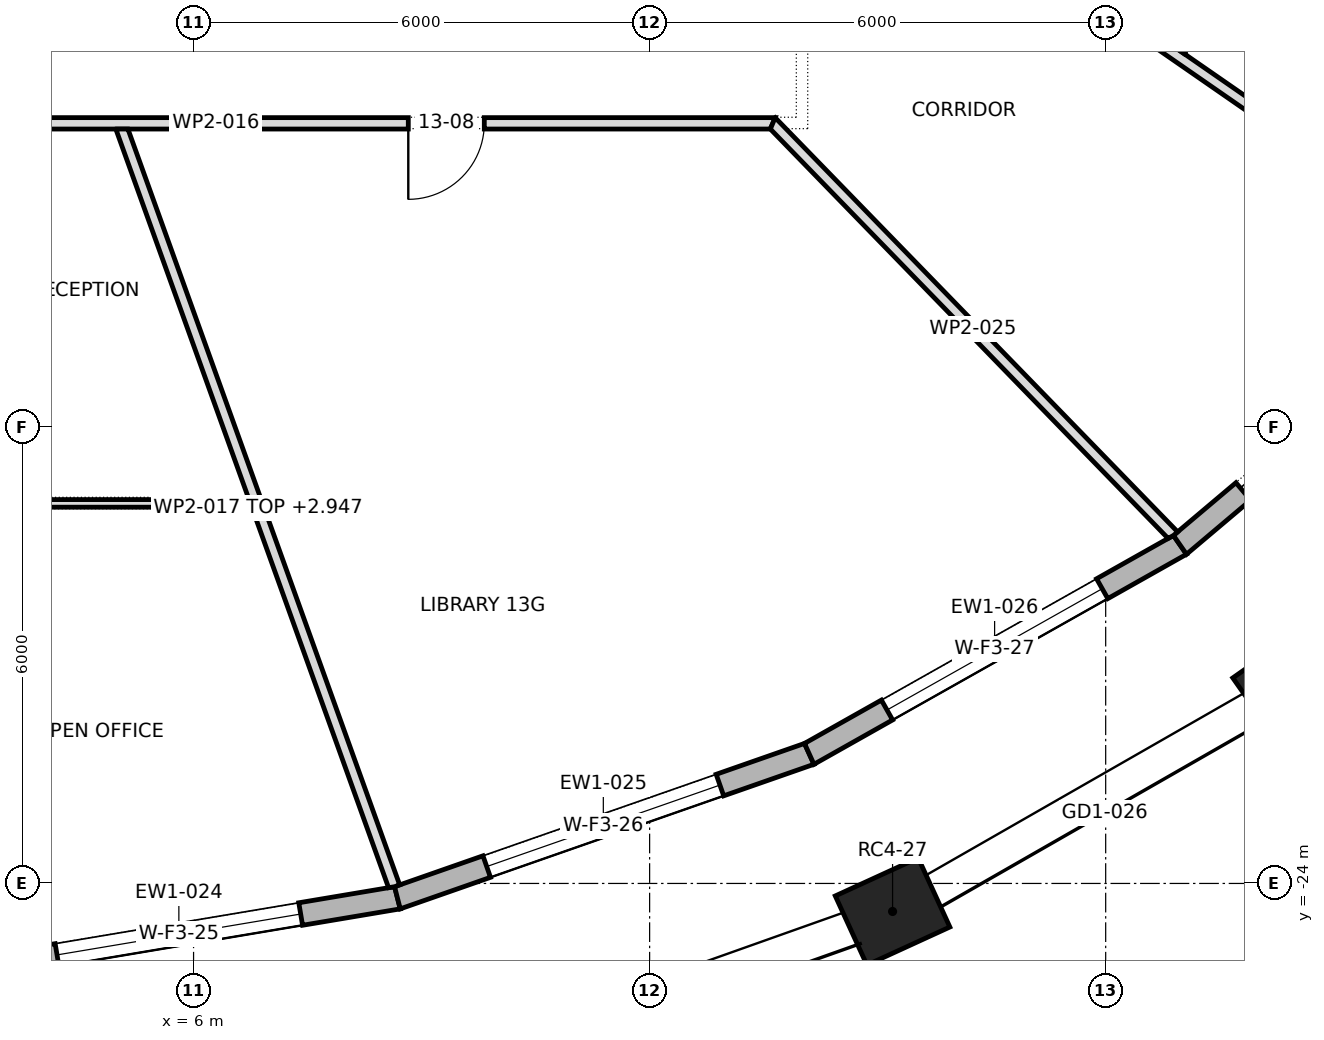
"""IFC4 building model, lengths in metres.
Left out: names, types, materials, properties, quantities, classifications, styles, units other than length and angle.
Written with IfcOpenShell. Run it as: python <this file> out.ifc"""

import sys

from ifc_helpers import new_model, si_unit, direction, frame, frame_2d, origin, origin_2d, place, context, subcontext, project, spatial, polyline, rectangle, outline, extrude, element, fill, save


model = new_model("IFC4")
c1 = context("Model", 3, precision=1e-05, world=origin(), true_north=direction((0.0, 1.0)))
c2 = subcontext(c1, "Body", "Model", "MODEL_VIEW")
j1 = project(units=[si_unit("LENGTHUNIT", "METRE"), si_unit("PLANEANGLEUNIT", "RADIAN")], contexts=[c1])
p1 = place(None, origin())
s1 = spatial("IfcSite", under=j1, at=p1, CompositionType="ELEMENT")
p2 = place(p1, origin())
s2 = spatial("IfcBuilding", under=s1, at=p2, CompositionType="ELEMENT")
p3 = place(p2, frame((0.0, 0.0, 198.9)))
s3 = spatial("IfcBuildingStorey", under=s2, at=p3, CompositionType="ELEMENT", Elevation=198.9)
for number, where, z_axis, x_axis in (
    (1, (15.196, -24.369, 0.0), (0.0, 0.0, 1.0), (0.909, 0.417, 0.0)),
    (2, (20.451, -21.359, 0.0), (0.0, 0.0, 1.0), (0.818, 0.575, 0.0)),
):
    element("IfcColumn", number, at=place(p3, frame(where, z_axis=z_axis, x_axis=x_axis)), inside=s3, PredefinedType="COLUMN", context=c2, shape_type="SweptSolid", body=[
        extrude(rectangle(XDim=1.2, YDim=1.0, at=origin_2d()), origin(), (0.0, 0.0, 1.0), 4.0),
    ])
p4 = place(p3, frame((2.931, -25.154, 0.0), z_axis=(0.0, 0.0, 1.0), x_axis=(0.986207709048, 0.165512400181, 0.0)))
e3 = element("IfcWall", 3, at=p4, inside=s3, PredefinedType="STANDARD", context=c2, shape_type="SweptSolid", body=[
    extrude(outline(polyline([(-0.012, -0.15), (5.844, -0.15), (5.818, 0.15), (0.012, 0.15), (-0.012, -0.15)])), origin(), (0.0, 0.0, 1.0), 3.7),
])
p5 = place(p4, frame((1.291, 0.0, 0.6)))
e4 = element("IfcOpeningElement", 4, at=p5, cuts=e3, PredefinedType="OPENING", context=c2, shape_type="SweptSolid", body=[
    extrude(rectangle(XDim=3.25, YDim=2.65, at=frame_2d((1.625, 1.325))), frame((0.0, 0.162, 0.0), z_axis=(0.0, -1.0, 0.0), x_axis=(1.0, 0.0, 0.0)), (0.0, 0.0, 1.0), 0.324),
])
p6 = place(p3, frame((8.682, -24.189, 0.0), z_axis=(0.0, 0.0, 1.0), x_axis=(0.944020060936, 0.329888048511, 0.0)))
e5 = element("IfcWall", 5, at=p6, inside=s3, PredefinedType="STANDARD", context=c2, shape_type="SweptSolid", body=[
    extrude(outline(polyline([(-0.013, -0.15), (5.753, -0.15), (5.726, 0.15), (0.013, 0.15), (-0.013, -0.15)])), origin(), (0.0, 0.0, 1.0), 3.7),
])
p7 = place(p6, frame((1.245, 0.0, 0.6)))
e6 = element("IfcOpeningElement", 6, at=p7, cuts=e5, PredefinedType="OPENING", context=c2, shape_type="SweptSolid", body=[
    extrude(rectangle(XDim=3.25, YDim=2.65, at=frame_2d((1.625, 1.325))), frame((0.0, 0.162, 0.0), z_axis=(0.0, -1.0, 0.0), x_axis=(1.0, 0.0, 0.0)), (0.0, 0.0, 1.0), 0.324),
])
p8 = place(p3, frame((14.1, -22.295, 0.0), z_axis=(0.0, 0.0, 1.0), x_axis=(0.871083701819, 0.491134588912, 0.0)))
e7 = element("IfcWall", 7, at=p8, inside=s3, PredefinedType="STANDARD", context=c2, shape_type="SweptSolid", body=[
    extrude(outline(polyline([(-0.013, -0.15), (5.614, -0.15), (5.585, 0.15), (0.013, 0.15), (-0.013, -0.15)])), origin(), (0.0, 0.0, 1.0), 3.7),
])
p9 = place(p8, frame((1.175, 0.0, 0.6)))
e8 = element("IfcOpeningElement", 8, at=p9, cuts=e7, PredefinedType="OPENING", context=c2, shape_type="SweptSolid", body=[
    extrude(rectangle(XDim=3.25, YDim=2.65, at=frame_2d((1.625, 1.325))), frame((0.0, 0.162, 0.0), z_axis=(0.0, -1.0, 0.0), x_axis=(1.0, 0.0, 0.0)), (0.0, 0.0, 1.0), 0.324),
])
p10 = place(p3, frame((18.977, -19.545, 0.0), z_axis=(0.0, 0.0, 1.0), x_axis=(0.764330261608, 0.644824977176, 0.0)))
e9 = element("IfcWall", 9, at=p10, inside=s3, PredefinedType="STANDARD", context=c2, shape_type="SweptSolid", body=[
    extrude(outline(polyline([(-0.014, -0.15), (5.445, -0.15), (5.415, 0.15), (0.014, 0.15), (-0.014, -0.15)])), origin(), (0.0, 0.0, 1.0), 3.7),
])
p11 = place(p10, frame((1.09, 0.0, 0.0)))
e10 = element("IfcOpeningElement", 10, at=p11, cuts=e9, PredefinedType="OPENING", context=c2, shape_type="SweptSolid", body=[
    extrude(rectangle(XDim=3.25, YDim=3.25, at=frame_2d((1.625, 1.625))), frame((0.0, 0.162, 0.0), z_axis=(0.0, -1.0, 0.0), x_axis=(1.0, 0.0, 0.0)), (0.0, 0.0, 1.0), 0.324),
])
p12 = place(p3, frame((-1.63, -14.0, 0.0), z_axis=(0.0, 0.0, 1.0), x_axis=(1.0, 0.0, 0.0)))
e11 = element("IfcWall", 11, at=p12, inside=s3, PredefinedType="PARTITIONING", context=c2, shape_type="SweptSolid", body=[
    extrude(outline(polyline([(0.0, -0.075), (1.902, -0.075), (3.804, -0.075), (5.707, -0.075), (7.609, -0.075), (9.511, -0.075), (11.414, -0.075), (13.316, -0.075), (15.218, -0.075), (15.281, 0.075), (15.281, 0.075), (13.371, 0.075), (11.461, 0.075), (9.551, 0.075), (7.641, 0.075), (5.73, 0.075), (3.82, 0.075), (1.91, 0.075), (0.0, 0.075), (0.0, -0.075)])), origin(), (0.0, 0.0, 1.0), 3.7),
])
p13 = place(p12, frame((2.83, 0.0, 0.0)))
e12 = element("IfcOpeningElement", 12, at=p13, cuts=e11, PredefinedType="OPENING", context=c2, shape_type="SweptSolid", body=[
    extrude(rectangle(XDim=1.0, YDim=2.1, at=frame_2d((0.5, 1.05))), frame((0.0, 0.087, 0.0), z_axis=(0.0, -1.0, 0.0), x_axis=(1.0, 0.0, 0.0)), (0.0, 0.0, 1.0), 0.174),
])
p14 = place(p12, frame((10.455, 0.0, 0.0)))
e13 = element("IfcOpeningElement", 13, at=p14, cuts=e11, PredefinedType="OPENING", context=c2, shape_type="SweptSolid", body=[
    extrude(rectangle(XDim=1.0, YDim=2.1, at=frame_2d((0.5, 1.05))), frame((0.0, 0.087, 0.0), z_axis=(0.0, -1.0, 0.0), x_axis=(1.0, 0.0, 0.0)), (0.0, 0.0, 1.0), 0.174),
])
p15 = place(p3, frame((5.048, -14.05, 0.0), z_axis=(0.0, 0.0, 1.0), x_axis=(0.338318960249, -0.941031498482, 0.0)))
e14 = element("IfcWall", 14, at=p15, inside=s3, PredefinedType="PARTITIONING", context=c2, shape_type="SweptSolid", body=[
    extrude(outline(polyline([(0.0, -0.075), (1.727, -0.075), (3.454, -0.075), (5.18, -0.075), (5.181, -0.073), (5.188, -0.075), (6.994, -0.075), (8.8, -0.075), (10.606, -0.075), (10.621, 0.004), (10.621, 0.032), (10.621, 0.075), (8.86, 0.075), (7.098, 0.075), (5.337, 0.075), (3.576, 0.075), (1.815, 0.075), (0.054, 0.075), (0.0, -0.074), (0.0, -0.075)])), origin(), (0.0, 0.0, 1.0), 2.947),
])
p16 = place(p3, frame((6.765, -19.0, 0.0), z_axis=(0.0, 0.0, 1.0), x_axis=(-1.0, 0.0, 0.0)))
e15 = element("IfcWall", 15, at=p16, inside=s3, PredefinedType="PARTITIONING", context=c2, shape_type="SweptSolid", body=[
    extrude(outline(polyline([(0.035, -0.05), (1.807, -0.05), (3.579, -0.05), (5.351, -0.05), (7.122, -0.05), (8.894, -0.05), (8.905, 0.046), (8.905, 0.05), (7.124, 0.05), (5.343, 0.05), (3.562, 0.05), (1.781, 0.05), (0.0, 0.05), (0.0, 0.049), (0.035, -0.05)])), origin(), (0.0, 0.0, 1.0), 3.7),
])
p17 = place(p16, frame((4.006, 0.0, 0.0)))
e16 = element("IfcOpeningElement", 16, at=p17, cuts=e15, PredefinedType="OPENING", context=c2, shape_type="SweptSolid", body=[
    extrude(rectangle(XDim=0.9, YDim=2.1, at=frame_2d((0.45, 1.05))), frame((0.0, 0.062, 0.0), z_axis=(0.0, -1.0, 0.0), x_axis=(1.0, 0.0, 0.0)), (0.0, 0.0, 1.0), 0.124),
])
p18 = place(p3, frame((13.968, -9.667, 0.0), z_axis=(0.0, 0.0, 1.0), x_axis=(0.822097241007, -0.569347105313, 0.0)))
e17 = element("IfcWall", 17, at=p18, inside=s3, PredefinedType="PARTITIONING", context=c2, shape_type="SweptSolid", body=[
    extrude(outline(polyline([(0.0, -0.075), (1.832, -0.075), (3.664, -0.075), (5.496, -0.075), (7.328, -0.075), (9.16, -0.075), (10.992, -0.075), (11.012, -0.002), (11.017, 0.07), (11.017, 0.075), (9.349, 0.075), (7.682, 0.075), (6.014, 0.075), (6.01, 0.072), (6.009, 0.075), (4.032, 0.075), (2.055, 0.075), (0.079, 0.075), (0.039, -0.0), (0.0, -0.075)])), origin(), (0.0, 0.0, 1.0), 2.947),
])
p19 = place(p3, frame((18.893, -19.427, 0.0), z_axis=(0.0, 0.0, 1.0), x_axis=(-0.696864554069, 0.717202756048, 0.0)))
e18 = element("IfcWall", 18, at=p19, inside=s3, PredefinedType="PARTITIONING", context=c2, shape_type="SweptSolid", body=[
    extrude(outline(polyline([(0.0, -0.075), (1.9, -0.075), (3.799, -0.075), (5.699, -0.075), (7.599, -0.075), (7.567, 0.0), (7.535, 0.075), (5.658, 0.075), (3.78, 0.075), (1.903, 0.075), (0.025, 0.075), (0.005, -0.003), (0.0, -0.073), (0.0, -0.075)])), origin(), (0.0, 0.0, 1.0), 3.7),
])
p20 = place(p3, frame((19.0, -4.926, 0.0), z_axis=(0.0, 0.0, 1.0), x_axis=(0.0, -1.0, 0.0)))
e19 = element("IfcWall", 19, at=p20, inside=s3, PredefinedType="PARTITIONING", context=c2, shape_type="SweptSolid", body=[
    extrude(outline(polyline([(0.0, -0.05), (1.62, -0.05), (3.24, -0.05), (4.86, -0.05), (6.481, -0.05), (8.101, -0.05), (8.169, 0.049), (8.169, 0.05), (6.541, 0.05), (4.912, 0.05), (3.283, 0.05), (1.654, 0.05), (0.025, 0.05), (0.0, -0.049), (0.0, -0.05)])), origin(), (0.0, 0.0, 1.0), 3.7),
])
p21 = place(p20, frame((3.629, 0.0, 0.0)))
e20 = element("IfcOpeningElement", 20, at=p21, cuts=e19, PredefinedType="OPENING", context=c2, shape_type="SweptSolid", body=[
    extrude(rectangle(XDim=0.9, YDim=2.1, at=frame_2d((0.45, 1.05))), frame((0.0, 0.062, 0.0), z_axis=(0.0, -1.0, 0.0), x_axis=(1.0, 0.0, 0.0)), (0.0, 0.0, 1.0), 0.124),
])
p22 = place(p5, origin())
e21 = element("IfcWindow", 21, at=p22, inside=s3, PartitioningType="TRIPLE_PANEL_VERTICAL", PredefinedType="WINDOW", context=c2, shape_type="SweptSolid", body=[
    extrude(rectangle(XDim=3.25, YDim=2.65, at=frame_2d((1.625, 1.325))), frame((0.0, 0.03, 0.0), z_axis=(0.0, -1.0, 0.0), x_axis=(1.0, 0.0, 0.0)), (0.0, 0.0, 1.0), 0.06),
])
fill(e4, e21)
p23 = place(p7, origin())
e22 = element("IfcWindow", 22, at=p23, inside=s3, PartitioningType="TRIPLE_PANEL_VERTICAL", PredefinedType="WINDOW", context=c2, shape_type="SweptSolid", body=[
    extrude(rectangle(XDim=3.25, YDim=2.65, at=frame_2d((1.625, 1.325))), frame((0.0, 0.03, 0.0), z_axis=(0.0, -1.0, 0.0), x_axis=(1.0, 0.0, 0.0)), (0.0, 0.0, 1.0), 0.06),
])
fill(e6, e22)
p24 = place(p9, origin())
e23 = element("IfcWindow", 23, at=p24, inside=s3, PartitioningType="TRIPLE_PANEL_VERTICAL", PredefinedType="WINDOW", context=c2, shape_type="SweptSolid", body=[
    extrude(rectangle(XDim=3.25, YDim=2.65, at=frame_2d((1.625, 1.325))), frame((0.0, 0.03, 0.0), z_axis=(0.0, -1.0, 0.0), x_axis=(1.0, 0.0, 0.0)), (0.0, 0.0, 1.0), 0.06),
])
fill(e8, e23)
p25 = place(p11, origin())
e24 = element("IfcDoor", 24, at=p25, inside=s3, OperationType="DOUBLE_DOOR_SLIDING", PredefinedType="DOOR", context=c2, shape_type="SweptSolid", body=[
    extrude(rectangle(XDim=3.25, YDim=3.25, at=frame_2d((1.625, 1.625))), frame((0.0, 0.025, 0.0), z_axis=(0.0, -1.0, 0.0), x_axis=(1.0, 0.0, 0.0)), (0.0, 0.0, 1.0), 0.05),
])
fill(e10, e24)
p26 = place(p14, frame((1.0, 0.0, 0.0), z_axis=(0.0, 0.0, 1.0), x_axis=(-1.0, 0.0, 0.0)))
e25 = element("IfcDoor", 25, at=p26, inside=s3, OperationType="SINGLE_SWING_LEFT", PredefinedType="DOOR", context=c2, shape_type="SweptSolid", body=[
    extrude(rectangle(XDim=1.0, YDim=2.1, at=frame_2d((0.5, 1.05))), frame((0.0, 0.025, 0.0), z_axis=(0.0, -1.0, 0.0), x_axis=(1.0, 0.0, 0.0)), (0.0, 0.0, 1.0), 0.05),
])
fill(e13, e25)
save(model, sys.argv[1])
